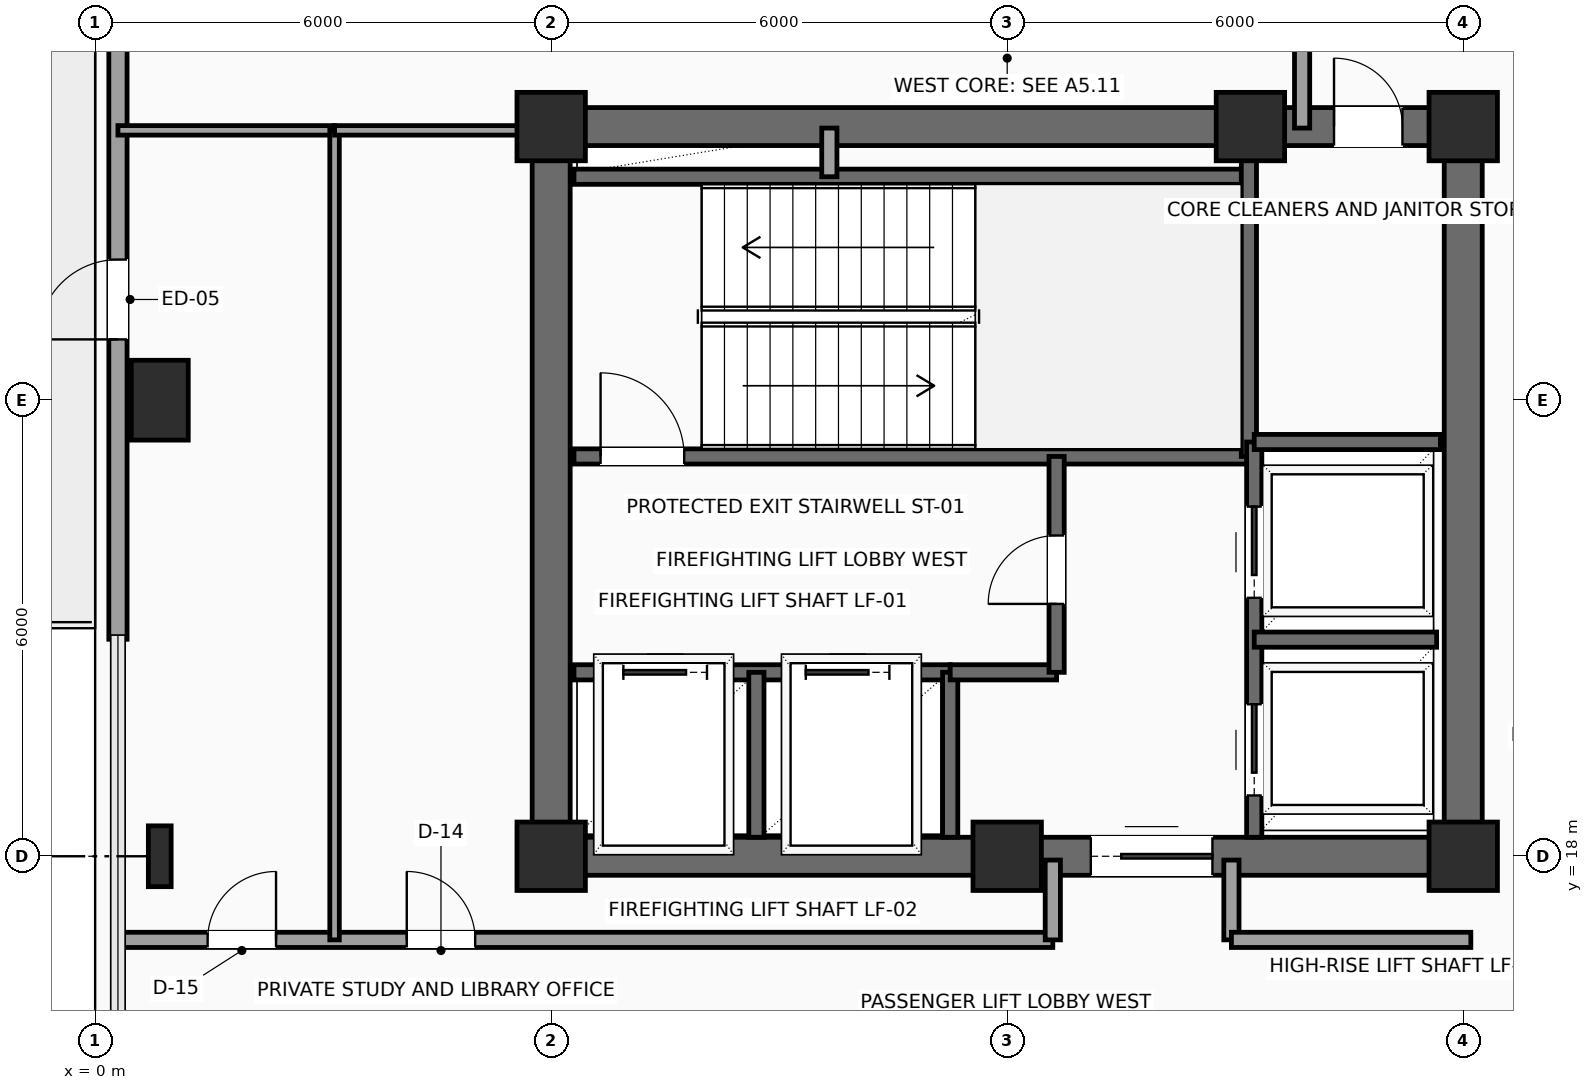
"""IFC4 building model, lengths in metres.
Left out: names, types, materials, properties, quantities, classifications, styles, units other than length and angle.
Written with IfcOpenShell. Run it as: python <this file> out.ifc"""

import sys

from ifc_helpers import new_model, si_unit, direction, frame, frame_2d, origin, origin_2d, place, context, subcontext, project, spatial, rectangle, i_section, extrude, element, fill, save


model = new_model("IFC4")
c1 = context("Model", 3, precision=1e-05, world=origin(), true_north=direction((0.0, 1.0)))
c2 = subcontext(c1, "Body", "Model", "MODEL_VIEW")
j1 = project(units=[si_unit("LENGTHUNIT", "METRE"), si_unit("PLANEANGLEUNIT", "RADIAN")], contexts=[c1])
p1 = place(None, origin())
s1 = spatial("IfcSite", under=j1, at=p1, CompositionType="ELEMENT")
p2 = place(p1, origin())
s2 = spatial("IfcBuilding", under=s1, at=p2, CompositionType="ELEMENT")
p3 = place(p2, frame((0.0, 0.0, 212.4)))
s3 = spatial("IfcBuildingStorey", under=s2, at=p3, CompositionType="ELEMENT", Elevation=212.4)
for number, where, z_axis, x_axis in (
    (1, (6.0, 18.0, 0.0), (0.0, 0.0, 1.0), (1.0, 0.0, 0.0)),
    (2, (12.0, 18.0, 0.0), (0.0, 0.0, 1.0), (1.0, 0.0, 0.0)),
    (3, (18.0, 18.0, 0.0), (0.0, 0.0, 1.0), (1.0, 0.0, 0.0)),
    (4, (6.0, 27.6, 0.0), (0.0, 0.0, 1.0), (1.0, 0.0, 0.0)),
    (5, (15.2, 27.6, 0.0), (0.0, 0.0, 1.0), (1.0, 0.0, 0.0)),
    (6, (18.0, 27.6, 0.0), (0.0, 0.0, 1.0), (1.0, 0.0, 0.0)),
):
    element("IfcColumn", number, at=place(p3, frame(where, z_axis=z_axis, x_axis=x_axis)), inside=s3, PredefinedType="COLUMN", context=c2, shape_type="SweptSolid", body=[
        extrude(rectangle(XDim=0.9, YDim=0.9, at=origin_2d()), origin(), (0.0, 0.0, 1.0), 3.75),
    ])
p4 = place(p3, frame((0.85, 18.0, 0.0), z_axis=(0.0, 0.0, 1.0), x_axis=(1.0, 0.0, 0.0)))
e7 = element("IfcColumn", 7, at=p4, inside=s3, PredefinedType="COLUMN", context=c2, shape_type="SweptSolid", body=[
    extrude(i_section(OverallWidth=0.3, OverallDepth=0.8, WebThickness=0.018, FlangeThickness=0.033, FilletRadius=0.03, at=origin_2d()), origin(), (0.0, 0.0, 1.0), 3.75),
])
p5 = place(p3, frame((0.85, 24.0, 0.0), z_axis=(0.0, 0.0, 1.0), x_axis=(1.0, 0.0, 0.0)))
e8 = element("IfcColumn", 8, at=p5, inside=s3, PredefinedType="COLUMN", context=c2, shape_type="SweptSolid", body=[
    extrude(rectangle(XDim=0.75, YDim=1.05, at=origin_2d()), origin(), (0.0, 0.0, 1.0), 3.75),
])
p6 = place(p3, frame((0.3, 20.855, 0.0), z_axis=(0.0, 0.0, 1.0), x_axis=(0.0, 1.0, 0.0)))
e9 = element("IfcWall", 9, at=p6, inside=s3, PredefinedType="SOLIDWALL", context=c2, shape_type="SweptSolid", body=[
    extrude(rectangle(XDim=9.29, YDim=0.24, at=frame_2d((4.645, 0.0))), origin(), (0.0, 0.0, 1.0), 3.54),
])
p7 = place(p6, frame((3.945, 0.0, 0.0)))
e10 = element("IfcOpeningElement", 10, at=p7, cuts=e9, PredefinedType="OPENING", context=c2, shape_type="SweptSolid", body=[
    extrude(rectangle(XDim=1.05, YDim=2.2, at=frame_2d((0.525, 1.1))), frame((0.0, 0.13, 0.0), z_axis=(0.0, -1.0, 0.0), x_axis=(1.0, 0.0, 0.0)), (0.0, 0.0, 1.0), 0.26),
])
p8 = place(p3, frame((6.0, 18.0, 0.0), z_axis=(0.0, 0.0, 1.0), x_axis=(1.0, 0.0, 0.0)))
e11 = element("IfcWall", 11, at=p8, inside=s3, PredefinedType="SHEAR", context=c2, shape_type="SweptSolid", body=[
    extrude(rectangle(XDim=12.0, YDim=0.5, at=frame_2d((6.0, 0.0))), origin(), (0.0, 0.0, 1.0), 3.54),
])
p9 = place(p8, frame((7.1, 0.0, 0.0)))
e12 = element("IfcOpeningElement", 12, at=p9, cuts=e11, PredefinedType="OPENING", context=c2, shape_type="SweptSolid", body=[
    extrude(rectangle(XDim=1.6, YDim=2.3, at=frame_2d((0.8, 1.15))), frame((0.0, 0.26, 0.0), z_axis=(0.0, -1.0, 0.0), x_axis=(1.0, 0.0, 0.0)), (0.0, 0.0, 1.0), 0.52),
])
p10 = place(p3, frame((6.0, 27.6, 0.0), z_axis=(0.0, 0.0, 1.0), x_axis=(1.0, 0.0, 0.0)))
e13 = element("IfcWall", 13, at=p10, inside=s3, PredefinedType="SHEAR", context=c2, shape_type="SweptSolid", body=[
    extrude(rectangle(XDim=12.0, YDim=0.5, at=frame_2d((6.0, 0.0))), origin(), (0.0, 0.0, 1.0), 3.54),
])
p11 = place(p10, frame((10.3, 0.0, 0.0)))
e14 = element("IfcOpeningElement", 14, at=p11, cuts=e13, PredefinedType="OPENING", context=c2, shape_type="SweptSolid", body=[
    extrude(rectangle(XDim=0.9, YDim=2.15, at=frame_2d((0.45, 1.075))), frame((0.0, 0.26, 0.0), z_axis=(0.0, -1.0, 0.0), x_axis=(1.0, 0.0, 0.0)), (0.0, 0.0, 1.0), 0.52),
])
for number, where, z_axis, x_axis in (
    (15, (6.0, 18.0, 0.0), (0.0, 0.0, 1.0), (0.0, 1.0, 0.0)),
    (16, (18.0, 18.0, 0.0), (0.0, 0.0, 1.0), (0.0, 1.0, 0.0)),
):
    element("IfcWall", number, at=place(p3, frame(where, z_axis=z_axis, x_axis=x_axis)), inside=s3, PredefinedType="SHEAR", context=c2, shape_type="SweptSolid", body=[
        extrude(rectangle(XDim=9.6, YDim=0.5, at=frame_2d((4.8, 0.0))), origin(), (0.0, 0.0, 1.0), 3.54),
    ])
p12 = place(p3, frame((6.3, 23.26, 0.0), z_axis=(0.0, 0.0, 1.0), x_axis=(1.0, 0.0, 0.0)))
e17 = element("IfcWall", 17, at=p12, inside=s3, PredefinedType="SHEAR", context=c2, shape_type="SweptSolid", body=[
    extrude(rectangle(XDim=8.88, YDim=0.2, at=frame_2d((4.44, 0.0))), origin(), (0.0, 0.0, 1.0), 3.54),
])
p13 = place(p12, frame((0.35, 0.0, 0.0)))
e18 = element("IfcOpeningElement", 18, at=p13, cuts=e17, PredefinedType="OPENING", context=c2, shape_type="SweptSolid", body=[
    extrude(rectangle(XDim=1.1, YDim=2.2, at=frame_2d((0.55, 1.1))), frame((0.0, 0.11, 0.0), z_axis=(0.0, -1.0, 0.0), x_axis=(1.0, 0.0, 0.0)), (0.0, 0.0, 1.0), 0.22),
])
p14 = place(p3, frame((6.3, 26.94, 0.0), z_axis=(0.0, 0.0, 1.0), x_axis=(1.0, 0.0, 0.0)))
e19 = element("IfcWall", 19, at=p14, inside=s3, PredefinedType="SHEAR", context=c2, shape_type="SweptSolid", body=[
    extrude(rectangle(XDim=8.88, YDim=0.2, at=frame_2d((4.44, 0.0))), origin(), (0.0, 0.0, 1.0), 3.54),
])
p15 = place(p3, frame((15.18, 23.26, 0.0), z_axis=(0.0, 0.0, 1.0), x_axis=(0.0, 1.0, 0.0)))
e20 = element("IfcWall", 20, at=p15, inside=s3, PredefinedType="SHEAR", context=c2, shape_type="SweptSolid", body=[
    extrude(rectangle(XDim=4.04, YDim=0.2, at=frame_2d((2.02, 0.0))), origin(), (0.0, 0.0, 1.0), 3.54),
])
p16 = place(p3, frame((6.3, 20.42, 0.0), z_axis=(0.0, 0.0, 1.0), x_axis=(1.0, 0.0, 0.0)))
e21 = element("IfcWall", 21, at=p16, inside=s3, PredefinedType="SHEAR", context=c2, shape_type="SweptSolid", body=[
    extrude(rectangle(XDim=4.95, YDim=0.2, at=frame_2d((2.475, 0.0))), origin(), (0.0, 0.0, 1.0), 3.54),
])
p17 = place(p16, frame((0.65, 0.0, 0.0)))
e22 = element("IfcOpeningElement", 22, at=p17, cuts=e21, PredefinedType="OPENING", context=c2, shape_type="SweptSolid", body=[
    extrude(rectangle(XDim=1.1, YDim=2.2, at=frame_2d((0.55, 1.1))), frame((0.0, 0.11, 0.0), z_axis=(0.0, -1.0, 0.0), x_axis=(1.0, 0.0, 0.0)), (0.0, 0.0, 1.0), 0.22),
])
p18 = place(p16, frame((3.05, 0.0, 0.0)))
e23 = element("IfcOpeningElement", 23, at=p18, cuts=e21, PredefinedType="OPENING", context=c2, shape_type="SweptSolid", body=[
    extrude(rectangle(XDim=1.1, YDim=2.2, at=frame_2d((0.55, 1.1))), frame((0.0, 0.11, 0.0), z_axis=(0.0, -1.0, 0.0), x_axis=(1.0, 0.0, 0.0)), (0.0, 0.0, 1.0), 0.22),
])
for number, where, z_axis, x_axis in (
    (24, (8.7, 18.25, 0.0), (0.0, 0.0, 1.0), (0.0, 1.0, 0.0)),
    (25, (11.25, 18.25, 0.0), (0.0, 0.0, 1.0), (0.0, 1.0, 0.0)),
):
    element("IfcWall", number, at=place(p3, frame(where, z_axis=z_axis, x_axis=x_axis)), inside=s3, PredefinedType="SHEAR", context=c2, shape_type="SweptSolid", body=[
        extrude(rectangle(XDim=2.17, YDim=0.2, at=frame_2d((1.085, 0.0))), origin(), (0.0, 0.0, 1.0), 3.54),
    ])
p19 = place(p3, frame((11.25, 20.42, 0.0), z_axis=(0.0, 0.0, 1.0), x_axis=(1.0, 0.0, 0.0)))
e26 = element("IfcWall", 26, at=p19, inside=s3, PredefinedType="SHEAR", context=c2, shape_type="SweptSolid", body=[
    extrude(rectangle(XDim=1.4, YDim=0.2, at=frame_2d((0.7, 0.0))), origin(), (0.0, 0.0, 1.0), 3.54),
])
p20 = place(p3, frame((12.65, 20.42, 0.0), z_axis=(0.0, 0.0, 1.0), x_axis=(0.0, 1.0, 0.0)))
e27 = element("IfcWall", 27, at=p20, inside=s3, PredefinedType="SHEAR", context=c2, shape_type="SweptSolid", body=[
    extrude(rectangle(XDim=2.84, YDim=0.2, at=frame_2d((1.42, 0.0))), origin(), (0.0, 0.0, 1.0), 3.54),
])
p21 = place(p20, frame((0.9, 0.0, 0.0)))
e28 = element("IfcOpeningElement", 28, at=p21, cuts=e27, PredefinedType="OPENING", context=c2, shape_type="SweptSolid", body=[
    extrude(rectangle(XDim=0.9, YDim=2.15, at=frame_2d((0.45, 1.075))), frame((0.0, 0.11, 0.0), z_axis=(0.0, -1.0, 0.0), x_axis=(1.0, 0.0, 0.0)), (0.0, 0.0, 1.0), 0.22),
])
p22 = place(p3, frame((9.66, 26.94, 0.0), z_axis=(0.0, 0.0, 1.0), x_axis=(0.0, 1.0, 0.0)))
e29 = element("IfcWall", 29, at=p22, inside=s3, PredefinedType="SOLIDWALL", context=c2, shape_type="SweptSolid", body=[
    extrude(rectangle(XDim=0.64, YDim=0.2, at=frame_2d((0.32, 0.0))), origin(), (0.0, 0.0, 1.0), 3.54),
])
p23 = place(p3, frame((15.25, 18.25, 0.0), z_axis=(0.0, 0.0, 1.0), x_axis=(0.0, 1.0, 0.0)))
e30 = element("IfcWall", 30, at=p23, inside=s3, PredefinedType="SHEAR", context=c2, shape_type="SweptSolid", body=[
    extrude(rectangle(XDim=5.2, YDim=0.2, at=frame_2d((2.6, 0.0))), origin(), (0.0, 0.0, 1.0), 3.54),
])
p24 = place(p23, frame((0.55, 0.0, 0.0)))
e31 = element("IfcOpeningElement", 31, at=p24, cuts=e30, PredefinedType="OPENING", context=c2, shape_type="SweptSolid", body=[
    extrude(rectangle(XDim=1.2, YDim=2.2, at=frame_2d((0.6, 1.1))), frame((0.0, 0.11, 0.0), z_axis=(0.0, -1.0, 0.0), x_axis=(1.0, 0.0, 0.0)), (0.0, 0.0, 1.0), 0.22),
])
p25 = place(p23, frame((3.15, 0.0, 0.0)))
e32 = element("IfcOpeningElement", 32, at=p25, cuts=e30, PredefinedType="OPENING", context=c2, shape_type="SweptSolid", body=[
    extrude(rectangle(XDim=1.2, YDim=2.2, at=frame_2d((0.6, 1.1))), frame((0.0, 0.11, 0.0), z_axis=(0.0, -1.0, 0.0), x_axis=(1.0, 0.0, 0.0)), (0.0, 0.0, 1.0), 0.22),
])
p26 = place(p3, frame((15.25, 20.85, 0.0), z_axis=(0.0, 0.0, 1.0), x_axis=(1.0, 0.0, 0.0)))
e33 = element("IfcWall", 33, at=p26, inside=s3, PredefinedType="SHEAR", context=c2, shape_type="SweptSolid", body=[
    extrude(rectangle(XDim=2.4, YDim=0.2, at=frame_2d((1.2, 0.0))), origin(), (0.0, 0.0, 1.0), 3.54),
])
p27 = place(p3, frame((15.25, 23.45, 0.0), z_axis=(0.0, 0.0, 1.0), x_axis=(1.0, 0.0, 0.0)))
e34 = element("IfcWall", 34, at=p27, inside=s3, PredefinedType="SHEAR", context=c2, shape_type="SweptSolid", body=[
    extrude(rectangle(XDim=2.45, YDim=0.2, at=frame_2d((1.225, 0.0))), origin(), (0.0, 0.0, 1.0), 3.54),
])
p28 = place(p3, frame((0.3, 16.9, 0.0), z_axis=(0.0, 0.0, 1.0), x_axis=(1.0, 0.0, 0.0)))
e35 = element("IfcWall", 35, at=p28, inside=s3, PredefinedType="PARTITIONING", context=c2, shape_type="SweptSolid", body=[
    extrude(rectangle(XDim=12.3, YDim=0.2, at=frame_2d((6.15, 0.0))), origin(), (0.0, 0.0, 1.0), 3.54),
])
p29 = place(p28, frame((1.18, 0.0, 0.0)))
e36 = element("IfcOpeningElement", 36, at=p29, cuts=e35, PredefinedType="OPENING", context=c2, shape_type="SweptSolid", body=[
    extrude(rectangle(XDim=0.9, YDim=2.1, at=frame_2d((0.45, 1.05))), frame((0.0, 0.11, 0.0), z_axis=(0.0, -1.0, 0.0), x_axis=(1.0, 0.0, 0.0)), (0.0, 0.0, 1.0), 0.22),
])
p30 = place(p28, frame((3.8, 0.0, 0.0)))
e37 = element("IfcOpeningElement", 37, at=p30, cuts=e35, PredefinedType="OPENING", context=c2, shape_type="SweptSolid", body=[
    extrude(rectangle(XDim=0.9, YDim=2.1, at=frame_2d((0.45, 1.05))), frame((0.0, 0.11, 0.0), z_axis=(0.0, -1.0, 0.0), x_axis=(1.0, 0.0, 0.0)), (0.0, 0.0, 1.0), 0.22),
])
for number, where, z_axis, x_axis in (
    (38, (12.6, 16.9, 0.0), (0.0, 0.0, 1.0), (0.0, 1.0, 0.0)),
    (39, (14.95, 17.95, 0.0), (0.0, 0.0, 1.0), (0.0, -1.0, 0.0)),
):
    element("IfcWall", number, at=place(p3, frame(where, z_axis=z_axis, x_axis=x_axis)), inside=s3, PredefinedType="PARTITIONING", context=c2, shape_type="SweptSolid", body=[
        extrude(rectangle(XDim=1.05, YDim=0.2, at=frame_2d((0.525, 0.0))), origin(), (0.0, 0.0, 1.0), 3.54),
    ])
p31 = place(p3, frame((14.95, 16.9, 0.0), z_axis=(0.0, 0.0, 1.0), x_axis=(1.0, 0.0, 0.0)))
e40 = element("IfcWall", 40, at=p31, inside=s3, PredefinedType="PARTITIONING", context=c2, shape_type="SweptSolid", body=[
    extrude(rectangle(XDim=3.15, YDim=0.2, at=frame_2d((1.575, 0.0))), origin(), (0.0, 0.0, 1.0), 3.54),
])
p32 = place(p3, frame((15.88, 27.58, 0.0), z_axis=(0.0, 0.0, 1.0), x_axis=(0.0, 1.0, 0.0)))
e41 = element("IfcWall", 41, at=p32, inside=s3, PredefinedType="PARTITIONING", context=c2, shape_type="SweptSolid", body=[
    extrude(rectangle(XDim=2.67, YDim=0.2, at=frame_2d((1.335, 0.0))), origin(), (0.0, 0.0, 1.0), 3.54),
])
p33 = place(p3, frame((0.3, 27.55, 0.0), z_axis=(0.0, 0.0, 1.0), x_axis=(1.0, 0.0, 0.0)))
e42 = element("IfcWall", 42, at=p33, inside=s3, PredefinedType="PARTITIONING", context=c2, shape_type="SweptSolid", body=[
    extrude(rectangle(XDim=2.85, YDim=0.125, at=frame_2d((1.425, 0.0))), origin(), (0.0, 0.0, 1.0), 3.54),
])
p34 = place(p3, frame((3.15, 16.9, 0.0), z_axis=(0.0, 0.0, 1.0), x_axis=(0.0, 1.0, 0.0)))
e43 = element("IfcWall", 43, at=p34, inside=s3, PredefinedType="PARTITIONING", context=c2, shape_type="SweptSolid", body=[
    extrude(rectangle(XDim=10.65, YDim=0.125, at=frame_2d((5.325, 0.0))), origin(), (0.0, 0.0, 1.0), 3.54),
])
p35 = place(p3, frame((3.15, 27.55, 0.0), z_axis=(0.0, 0.0, 1.0), x_axis=(1.0, 0.0, 0.0)))
e44 = element("IfcWall", 44, at=p35, inside=s3, PredefinedType="PARTITIONING", context=c2, shape_type="SweptSolid", body=[
    extrude(rectangle(XDim=2.8, YDim=0.125, at=frame_2d((1.4, 0.0))), origin(), (0.0, 0.0, 1.0), 3.54),
])
p36 = place(p7, origin())
e45 = element("IfcDoor", 45, at=p36, inside=s3, OperationType="SINGLE_SWING_LEFT", PredefinedType="DOOR", context=c2, shape_type="SweptSolid", body=[
    extrude(rectangle(XDim=1.05, YDim=2.2, at=frame_2d((0.525, 1.1))), frame((0.0, 0.025, 0.0), z_axis=(0.0, -1.0, 0.0), x_axis=(1.0, 0.0, 0.0)), (0.0, 0.0, 1.0), 0.05),
])
fill(e10, e45)
p37 = place(p9, origin())
e46 = element("IfcDoor", 46, at=p37, inside=s3, OperationType="DOUBLE_DOOR_SLIDING", PredefinedType="DOOR", context=c2, shape_type="SweptSolid", body=[
    extrude(rectangle(XDim=1.6, YDim=2.3, at=frame_2d((0.8, 1.15))), frame((0.0, 0.025, 0.0), z_axis=(0.0, -1.0, 0.0), x_axis=(1.0, 0.0, 0.0)), (0.0, 0.0, 1.0), 0.05),
])
fill(e12, e46)
p38 = place(p11, origin())
e47 = element("IfcDoor", 47, at=p38, inside=s3, OperationType="SINGLE_SWING_LEFT", PredefinedType="DOOR", context=c2, shape_type="SweptSolid", body=[
    extrude(rectangle(XDim=0.9, YDim=2.15, at=frame_2d((0.45, 1.075))), frame((0.0, 0.025, 0.0), z_axis=(0.0, -1.0, 0.0), x_axis=(1.0, 0.0, 0.0)), (0.0, 0.0, 1.0), 0.05),
])
fill(e14, e47)
p39 = place(p13, origin())
e48 = element("IfcDoor", 48, at=p39, inside=s3, OperationType="SINGLE_SWING_LEFT", PredefinedType="DOOR", context=c2, shape_type="SweptSolid", body=[
    extrude(rectangle(XDim=1.1, YDim=2.2, at=frame_2d((0.55, 1.1))), frame((0.0, 0.025, 0.0), z_axis=(0.0, -1.0, 0.0), x_axis=(1.0, 0.0, 0.0)), (0.0, 0.0, 1.0), 0.05),
])
fill(e18, e48)
p40 = place(p17, origin())
e49 = element("IfcDoor", 49, at=p40, inside=s3, OperationType="SLIDING_TO_LEFT", PredefinedType="DOOR", context=c2, shape_type="SweptSolid", body=[
    extrude(rectangle(XDim=1.1, YDim=2.2, at=frame_2d((0.55, 1.1))), frame((0.0, 0.025, 0.0), z_axis=(0.0, -1.0, 0.0), x_axis=(1.0, 0.0, 0.0)), (0.0, 0.0, 1.0), 0.05),
])
fill(e22, e49)
p41 = place(p18, origin())
e50 = element("IfcDoor", 50, at=p41, inside=s3, OperationType="SLIDING_TO_LEFT", PredefinedType="DOOR", context=c2, shape_type="SweptSolid", body=[
    extrude(rectangle(XDim=1.1, YDim=2.2, at=frame_2d((0.55, 1.1))), frame((0.0, 0.025, 0.0), z_axis=(0.0, -1.0, 0.0), x_axis=(1.0, 0.0, 0.0)), (0.0, 0.0, 1.0), 0.05),
])
fill(e23, e50)
p42 = place(p21, origin())
e51 = element("IfcDoor", 51, at=p42, inside=s3, OperationType="SINGLE_SWING_LEFT", PredefinedType="DOOR", context=c2, shape_type="SweptSolid", body=[
    extrude(rectangle(XDim=0.9, YDim=2.15, at=frame_2d((0.45, 1.075))), frame((0.0, 0.025, 0.0), z_axis=(0.0, -1.0, 0.0), x_axis=(1.0, 0.0, 0.0)), (0.0, 0.0, 1.0), 0.05),
])
fill(e28, e51)
p43 = place(p24, origin())
e52 = element("IfcDoor", 52, at=p43, inside=s3, OperationType="SLIDING_TO_RIGHT", PredefinedType="DOOR", context=c2, shape_type="SweptSolid", body=[
    extrude(rectangle(XDim=1.2, YDim=2.2, at=frame_2d((0.6, 1.1))), frame((0.0, 0.025, 0.0), z_axis=(0.0, -1.0, 0.0), x_axis=(1.0, 0.0, 0.0)), (0.0, 0.0, 1.0), 0.05),
])
fill(e31, e52)
p44 = place(p25, origin())
e53 = element("IfcDoor", 53, at=p44, inside=s3, OperationType="SLIDING_TO_RIGHT", PredefinedType="DOOR", context=c2, shape_type="SweptSolid", body=[
    extrude(rectangle(XDim=1.2, YDim=2.2, at=frame_2d((0.6, 1.1))), frame((0.0, 0.025, 0.0), z_axis=(0.0, -1.0, 0.0), x_axis=(1.0, 0.0, 0.0)), (0.0, 0.0, 1.0), 0.05),
])
fill(e32, e53)
p45 = place(p29, origin())
e54 = element("IfcDoor", 54, at=p45, inside=s3, OperationType="SINGLE_SWING_RIGHT", PredefinedType="DOOR", context=c2, shape_type="SweptSolid", body=[
    extrude(rectangle(XDim=0.9, YDim=2.1, at=frame_2d((0.45, 1.05))), frame((0.0, 0.025, 0.0), z_axis=(0.0, -1.0, 0.0), x_axis=(1.0, 0.0, 0.0)), (0.0, 0.0, 1.0), 0.05),
])
fill(e36, e54)
p46 = place(p30, origin())
e55 = element("IfcDoor", 55, at=p46, inside=s3, OperationType="SINGLE_SWING_LEFT", PredefinedType="DOOR", context=c2, shape_type="SweptSolid", body=[
    extrude(rectangle(XDim=0.9, YDim=2.1, at=frame_2d((0.45, 1.05))), frame((0.0, 0.025, 0.0), z_axis=(0.0, -1.0, 0.0), x_axis=(1.0, 0.0, 0.0)), (0.0, 0.0, 1.0), 0.05),
])
fill(e37, e55)
save(model, sys.argv[1])
